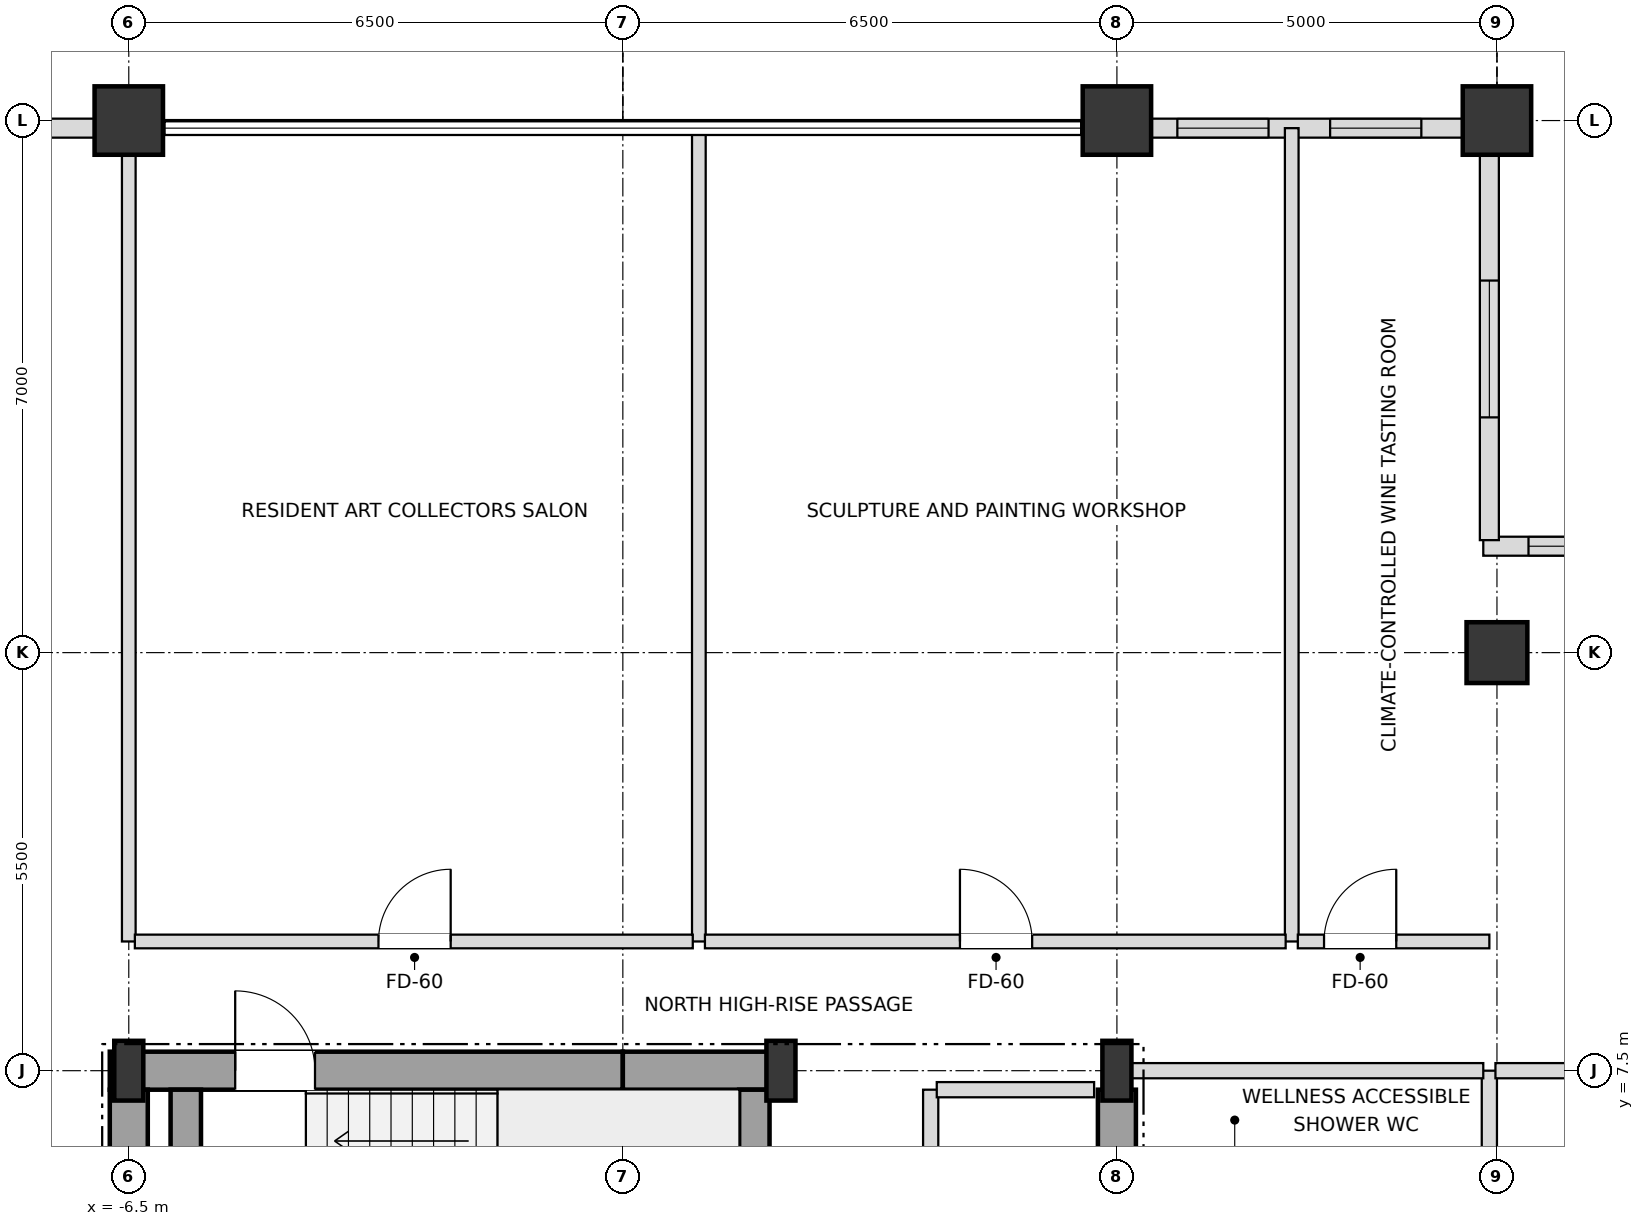
"""IFC4 building model, lengths in metres.
Left out: names, types, materials, properties, quantities, classifications, styles, units other than length and angle.
Written with IfcOpenShell. Run it as: python <this file> out.ifc"""

import sys

from ifc_helpers import new_model, si_unit, direction, frame, frame_2d, origin, origin_2d, place, context, subcontext, project, spatial, rectangle, i_section, extrude, element, fill, save


model = new_model("IFC4")
c1 = context("Model", 3, precision=1e-05, world=origin(), true_north=direction((0.0, 1.0)))
c2 = subcontext(c1, "Body", "Model", "MODEL_VIEW")
j1 = project(units=[si_unit("LENGTHUNIT", "METRE"), si_unit("PLANEANGLEUNIT", "RADIAN")], contexts=[c1])
p1 = place(None, origin())
s1 = spatial("IfcSite", under=j1, at=p1, CompositionType="ELEMENT")
p2 = place(p1, origin())
s2 = spatial("IfcBuilding", under=s1, at=p2, CompositionType="ELEMENT")
p3 = place(p2, frame((0.0, 0.0, 272.7)))
s3 = spatial("IfcBuildingStorey", under=s2, at=p3, CompositionType="ELEMENT", Elevation=272.7)
for number, where, z_axis, x_axis in (
    (1, (-6.5, 7.5, 0.0), (0.0, 0.0, 1.0), (1.0, 0.0, 0.0)),
    (2, (2.08, 7.5, 0.0), (0.0, 0.0, 1.0), (1.0, 0.0, 0.0)),
    (3, (6.5, 7.5, 0.0), (0.0, 0.0, 1.0), (1.0, 0.0, 0.0)),
):
    element("IfcColumn", number, at=place(p3, frame(where, z_axis=z_axis, x_axis=x_axis)), inside=s3, PredefinedType="COLUMN", context=c2, shape_type="SweptSolid", body=[
        extrude(i_section(OverallWidth=0.382, OverallDepth=0.786, WebThickness=0.02, FlangeThickness=0.033, at=origin_2d()), origin(), (0.0, 0.0, 1.0), 3.6),
    ])
for number, where, z_axis, x_axis in (
    (4, (11.5, 20.0, 0.0), (0.0, 0.0, 1.0), (1.0, 0.0, 0.0)),
    (5, (6.5, 20.0, 0.0), (0.0, 0.0, 1.0), (1.0, 0.0, 0.0)),
    (6, (-6.5, 20.0, 0.0), (0.0, 0.0, 1.0), (1.0, 0.0, 0.0)),
):
    element("IfcColumn", number, at=place(p3, frame(where, z_axis=z_axis, x_axis=x_axis)), inside=s3, PredefinedType="USERDEFINED", context=c2, shape_type="SweptSolid", body=[
        extrude(rectangle(XDim=0.9, YDim=0.9, at=origin_2d()), origin(), (0.0, 0.0, 1.0), 3.6),
    ])
p4 = place(p3, frame((11.5, 13.0, 0.0), z_axis=(0.0, 0.0, 1.0), x_axis=(1.0, 0.0, 0.0)))
e7 = element("IfcColumn", 7, at=p4, inside=s3, PredefinedType="COLUMN", context=c2, shape_type="SweptSolid", body=[
    extrude(rectangle(XDim=0.8, YDim=0.8, at=origin_2d()), origin(), (0.0, 0.0, 1.0), 3.6),
])
p5 = place(p3, frame((11.055, 19.9, 0.0), z_axis=(0.0, 0.0, 1.0), x_axis=(-1.0, 0.0, 0.0)))
e8 = element("IfcWall", 8, at=p5, inside=s3, PredefinedType="SOLIDWALL", context=c2, shape_type="SweptSolid", body=[
    extrude(rectangle(XDim=4.11, YDim=0.25, at=frame_2d((2.055, 0.0))), origin(), (0.0, 0.0, 1.0), 2.748),
])
p6 = place(p5, frame((0.55, 0.0, 0.72)))
e9 = element("IfcOpeningElement", 9, at=p6, cuts=e8, PredefinedType="OPENING", context=c2, shape_type="SweptSolid", body=[
    extrude(rectangle(XDim=1.2, YDim=1.68, at=frame_2d((0.6, 0.84))), frame((0.0, 0.135, 0.0), z_axis=(0.0, -1.0, 0.0), x_axis=(1.0, 0.0, 0.0)), (0.0, 0.0, 1.0), 0.27),
])
p7 = place(p5, frame((2.56, 0.0, 0.72)))
e10 = element("IfcOpeningElement", 10, at=p7, cuts=e8, PredefinedType="OPENING", context=c2, shape_type="SweptSolid", body=[
    extrude(rectangle(XDim=1.2, YDim=1.68, at=frame_2d((0.6, 0.84))), frame((0.0, 0.135, 0.0), z_axis=(0.0, -1.0, 0.0), x_axis=(1.0, 0.0, 0.0)), (0.0, 0.0, 1.0), 0.27),
])
p8 = place(p3, frame((-6.945, 19.9, 0.0), z_axis=(0.0, 0.0, 1.0), x_axis=(-1.0, 0.0, 0.0)))
e11 = element("IfcWall", 11, at=p8, inside=s3, PredefinedType="SOLIDWALL", context=c2, shape_type="SweptSolid", body=[
    extrude(rectangle(XDim=4.11, YDim=0.25, at=frame_2d((2.055, 0.0))), origin(), (0.0, 0.0, 1.0), 2.748),
])
p9 = place(p8, frame((1.155, 0.0, 0.72)))
e12 = element("IfcOpeningElement", 12, at=p9, cuts=e11, PredefinedType="OPENING", context=c2, shape_type="SweptSolid", body=[
    extrude(rectangle(XDim=1.8, YDim=1.68, at=frame_2d((0.9, 0.84))), frame((0.0, 0.135, 0.0), z_axis=(0.0, -1.0, 0.0), x_axis=(1.0, 0.0, 0.0)), (0.0, 0.0, 1.0), 0.27),
])
p10 = place(p3, frame((16.98, 14.4, 0.0), z_axis=(0.0, 0.0, 1.0), x_axis=(-1.0, 0.0, 0.0)))
e13 = element("IfcWall", 13, at=p10, inside=s3, PredefinedType="SOLIDWALL", context=c2, shape_type="SweptSolid", body=[
    extrude(rectangle(XDim=5.66, YDim=0.25, at=frame_2d((2.83, 0.0))), origin(), (0.0, 0.0, 1.0), 2.748),
])
p11 = place(p10, frame((0.595, 0.0, 0.72)))
e14 = element("IfcOpeningElement", 14, at=p11, cuts=e13, PredefinedType="OPENING", context=c2, shape_type="SweptSolid", body=[
    extrude(rectangle(XDim=1.8, YDim=1.68, at=frame_2d((0.9, 0.84))), frame((0.0, 0.135, 0.0), z_axis=(0.0, -1.0, 0.0), x_axis=(1.0, 0.0, 0.0)), (0.0, 0.0, 1.0), 0.27),
])
p12 = place(p10, frame((3.265, 0.0, 0.72)))
e15 = element("IfcOpeningElement", 15, at=p12, cuts=e13, PredefinedType="OPENING", context=c2, shape_type="SweptSolid", body=[
    extrude(rectangle(XDim=1.8, YDim=1.68, at=frame_2d((0.9, 0.84))), frame((0.0, 0.135, 0.0), z_axis=(0.0, -1.0, 0.0), x_axis=(1.0, 0.0, 0.0)), (0.0, 0.0, 1.0), 0.27),
])
p13 = place(p3, frame((11.4, 14.48, 0.0), z_axis=(0.0, 0.0, 1.0), x_axis=(0.0, 1.0, 0.0)))
e16 = element("IfcWall", 16, at=p13, inside=s3, PredefinedType="SOLIDWALL", context=c2, shape_type="SweptSolid", body=[
    extrude(rectangle(XDim=5.34, YDim=0.25, at=frame_2d((2.67, 0.0))), origin(), (0.0, 0.0, 1.0), 2.748),
])
p14 = place(p13, frame((1.615, 0.0, 0.72)))
e17 = element("IfcOpeningElement", 17, at=p14, cuts=e16, PredefinedType="OPENING", context=c2, shape_type="SweptSolid", body=[
    extrude(rectangle(XDim=1.8, YDim=1.68, at=frame_2d((0.9, 0.84))), frame((0.0, 0.135, 0.0), z_axis=(0.0, -1.0, 0.0), x_axis=(1.0, 0.0, 0.0)), (0.0, 0.0, 1.0), 0.27),
])
p15 = place(p3, frame((-6.75, 7.5, 0.0), z_axis=(0.0, 0.0, 1.0), x_axis=(1.0, 0.0, 0.0)))
e18 = element("IfcWall", 18, at=p15, inside=s3, PredefinedType="SHEAR", context=c2, shape_type="SweptSolid", body=[
    extrude(rectangle(XDim=6.75, YDim=0.5, at=frame_2d((3.375, 0.0))), origin(), (0.0, 0.0, 1.0), 3.38),
])
p16 = place(p15, frame((1.65, 0.0, 0.0)))
e19 = element("IfcOpeningElement", 19, at=p16, cuts=e18, PredefinedType="OPENING", context=c2, shape_type="SweptSolid", body=[
    extrude(rectangle(XDim=1.05, YDim=2.15, at=frame_2d((0.525, 1.075))), frame((0.0, 0.26, 0.0), z_axis=(0.0, -1.0, 0.0), x_axis=(1.0, 0.0, 0.0)), (0.0, 0.0, 1.0), 0.52),
])
p17 = place(p3, frame((0.0, 7.5, 0.0), z_axis=(0.0, 0.0, 1.0), x_axis=(1.0, 0.0, 0.0)))
e20 = element("IfcWall", 20, at=p17, inside=s3, PredefinedType="SHEAR", context=c2, shape_type="SweptSolid", body=[
    extrude(rectangle(XDim=2.08, YDim=0.5, at=frame_2d((1.04, 0.0))), origin(), (0.0, 0.0, 1.0), 3.38),
])
for number, where, z_axis, x_axis in (
    (21, (-6.5, 3.95, 0.0), (0.0, 0.0, 1.0), (0.0, 1.0, 0.0)),
    (22, (6.5, 3.95, 0.0), (0.0, 0.0, 1.0), (0.0, 1.0, 0.0)),
):
    element("IfcWall", number, at=place(p3, frame(where, z_axis=z_axis, x_axis=x_axis)), inside=s3, PredefinedType="SHEAR", context=c2, shape_type="SweptSolid", body=[
        extrude(rectangle(XDim=3.3, YDim=0.5, at=frame_2d((1.65, 0.0))), origin(), (0.0, 0.0, 1.0), 3.38),
    ])
for number, where, z_axis, x_axis in (
    (23, (1.73, 3.95, 0.0), (0.0, 0.0, 1.0), (0.0, 1.0, 0.0)),
    (24, (-5.75, 3.95, 0.0), (0.0, 0.0, 1.0), (0.0, 1.0, 0.0)),
):
    element("IfcWall", number, at=place(p3, frame(where, z_axis=z_axis, x_axis=x_axis)), inside=s3, PredefinedType="SHEAR", context=c2, shape_type="SweptSolid", body=[
        extrude(rectangle(XDim=3.3, YDim=0.4, at=frame_2d((1.65, 0.0))), origin(), (0.0, 0.0, 1.0), 3.38),
    ])
p18 = place(p3, frame((-6.5, 9.2, 0.0), z_axis=(0.0, 0.0, 1.0), x_axis=(0.0, 1.0, 0.0)))
e25 = element("IfcWall", 25, at=p18, inside=s3, PredefinedType="PARTITIONING", context=c2, shape_type="SweptSolid", body=[
    extrude(rectangle(XDim=10.7, YDim=0.18, at=frame_2d((5.35, 0.0))), origin(), (0.0, 0.0, 1.0), 2.826),
])
p19 = place(p3, frame((1.0, 9.2, 0.0), z_axis=(0.0, 0.0, 1.0), x_axis=(0.0, 1.0, 0.0)))
e26 = element("IfcWall", 26, at=p19, inside=s3, PredefinedType="PARTITIONING", context=c2, shape_type="SweptSolid", body=[
    extrude(rectangle(XDim=10.7, YDim=0.18, at=frame_2d((5.35, 0.0))), origin(), (0.0, 0.0, 1.0), 3.018),
])
p20 = place(p3, frame((4.05, 4.2, 0.0), z_axis=(0.0, 0.0, 1.0), x_axis=(0.0, 1.0, 0.0)))
e27 = element("IfcWall", 27, at=p20, inside=s3, PredefinedType="SOLIDWALL", context=c2, shape_type="SweptSolid", body=[
    extrude(rectangle(XDim=3.05, YDim=0.2, at=frame_2d((1.525, 0.0))), origin(), (0.0, 0.0, 1.0), 3.38),
])
p21 = place(p20, frame((0.975, 0.0, 0.0)))
e28 = element("IfcOpeningElement", 28, at=p21, cuts=e27, PredefinedType="OPENING", context=c2, shape_type="SweptSolid", body=[
    extrude(rectangle(XDim=0.95, YDim=2.15, at=frame_2d((0.475, 1.075))), frame((0.0, 0.11, 0.0), z_axis=(0.0, -1.0, 0.0), x_axis=(1.0, 0.0, 0.0)), (0.0, 0.0, 1.0), 0.22),
])
p22 = place(p3, frame((8.8, 9.2, 0.0), z_axis=(0.0, 0.0, 1.0), x_axis=(0.0, 1.0, 0.0)))
e29 = element("IfcWall", 29, at=p22, inside=s3, PredefinedType="PARTITIONING", context=c2, shape_type="SweptSolid", body=[
    extrude(rectangle(XDim=10.7, YDim=0.18, at=frame_2d((5.35, 0.0))), origin(), (0.0, 0.0, 1.0), 2.826),
])
p23 = place(p3, frame((11.4, 4.5, 0.0), z_axis=(0.0, 0.0, 1.0), x_axis=(0.0, 1.0, 0.0)))
e30 = element("IfcWall", 30, at=p23, inside=s3, PredefinedType="SOLIDWALL", context=c2, shape_type="SweptSolid", body=[
    extrude(rectangle(XDim=3.0, YDim=0.2, at=frame_2d((1.5, 0.0))), origin(), (0.0, 0.0, 1.0), 3.018),
])
p24 = place(p3, frame((4.13, 7.25, 0.0), z_axis=(0.0, 0.0, 1.0), x_axis=(1.0, 0.0, 0.0)))
e31 = element("IfcWall", 31, at=p24, inside=s3, PredefinedType="SOLIDWALL", context=c2, shape_type="SweptSolid", body=[
    extrude(rectangle(XDim=2.07, YDim=0.2, at=frame_2d((1.035, 0.0))), origin(), (0.0, 0.0, 1.0), 3.38),
])
p25 = place(p3, frame((6.5, 7.5, 0.0), z_axis=(0.0, 0.0, 1.0), x_axis=(1.0, 0.0, 0.0)))
e32 = element("IfcWall", 32, at=p25, inside=s3, PredefinedType="SOLIDWALL", context=c2, shape_type="SweptSolid", body=[
    extrude(rectangle(XDim=4.82, YDim=0.2, at=frame_2d((2.41, 0.0))), origin(), (0.0, 0.0, 1.0), 2.826),
])
p26 = place(p3, frame((11.48, 7.5, 0.0), z_axis=(0.0, 0.0, 1.0), x_axis=(1.0, 0.0, 0.0)))
e33 = element("IfcWall", 33, at=p26, inside=s3, PredefinedType="SOLIDWALL", context=c2, shape_type="SweptSolid", body=[
    extrude(rectangle(XDim=5.42, YDim=0.2, at=frame_2d((2.71, 0.0))), origin(), (0.0, 0.0, 1.0), 2.826),
])
p27 = place(p3, frame((-6.42, 9.2, 0.0), z_axis=(0.0, 0.0, 1.0), x_axis=(1.0, 0.0, 0.0)))
e34 = element("IfcWall", 34, at=p27, inside=s3, PredefinedType="PARTITIONING", context=c2, shape_type="SweptSolid", body=[
    extrude(rectangle(XDim=7.34, YDim=0.18, at=frame_2d((3.67, 0.0))), origin(), (0.0, 0.0, 1.0), 3.38),
])
p28 = place(p27, frame((3.205, 0.0, 0.0)))
e35 = element("IfcOpeningElement", 35, at=p28, cuts=e34, PredefinedType="OPENING", context=c2, shape_type="SweptSolid", body=[
    extrude(rectangle(XDim=0.95, YDim=2.15, at=frame_2d((0.475, 1.075))), frame((0.0, 0.1, 0.0), z_axis=(0.0, -1.0, 0.0), x_axis=(1.0, 0.0, 0.0)), (0.0, 0.0, 1.0), 0.2),
])
p29 = place(p3, frame((1.08, 9.2, 0.0), z_axis=(0.0, 0.0, 1.0), x_axis=(1.0, 0.0, 0.0)))
e36 = element("IfcWall", 36, at=p29, inside=s3, PredefinedType="PARTITIONING", context=c2, shape_type="SweptSolid", body=[
    extrude(rectangle(XDim=7.64, YDim=0.18, at=frame_2d((3.82, 0.0))), origin(), (0.0, 0.0, 1.0), 2.826),
])
p30 = place(p29, frame((3.355, 0.0, 0.0)))
e37 = element("IfcOpeningElement", 37, at=p30, cuts=e36, PredefinedType="OPENING", context=c2, shape_type="SweptSolid", body=[
    extrude(rectangle(XDim=0.95, YDim=2.15, at=frame_2d((0.475, 1.075))), frame((0.0, 0.1, 0.0), z_axis=(0.0, -1.0, 0.0), x_axis=(1.0, 0.0, 0.0)), (0.0, 0.0, 1.0), 0.2),
])
p31 = place(p3, frame((8.88, 9.2, 0.0), z_axis=(0.0, 0.0, 1.0), x_axis=(1.0, 0.0, 0.0)))
e38 = element("IfcWall", 38, at=p31, inside=s3, PredefinedType="PARTITIONING", context=c2, shape_type="SweptSolid", body=[
    extrude(rectangle(XDim=2.52, YDim=0.18, at=frame_2d((1.26, 0.0))), origin(), (0.0, 0.0, 1.0), 3.38),
])
p32 = place(p31, frame((0.345, 0.0, 0.0)))
e39 = element("IfcOpeningElement", 39, at=p32, cuts=e38, PredefinedType="OPENING", context=c2, shape_type="SweptSolid", body=[
    extrude(rectangle(XDim=0.95, YDim=2.15, at=frame_2d((0.475, 1.075))), frame((0.0, 0.1, 0.0), z_axis=(0.0, -1.0, 0.0), x_axis=(1.0, 0.0, 0.0)), (0.0, 0.0, 1.0), 0.2),
])
p33 = place(p6, origin())
e40 = element("IfcWindow", 40, at=p33, inside=s3, PartitioningType="SINGLE_PANEL", PredefinedType="WINDOW", context=c2, shape_type="SweptSolid", body=[
    extrude(rectangle(XDim=1.2, YDim=1.68, at=frame_2d((0.6, 0.84))), frame((0.0, 0.03, 0.0), z_axis=(0.0, -1.0, 0.0), x_axis=(1.0, 0.0, 0.0)), (0.0, 0.0, 1.0), 0.06),
])
fill(e9, e40)
p34 = place(p7, origin())
e41 = element("IfcWindow", 41, at=p34, inside=s3, PartitioningType="SINGLE_PANEL", PredefinedType="WINDOW", context=c2, shape_type="SweptSolid", body=[
    extrude(rectangle(XDim=1.2, YDim=1.68, at=frame_2d((0.6, 0.84))), frame((0.0, 0.03, 0.0), z_axis=(0.0, -1.0, 0.0), x_axis=(1.0, 0.0, 0.0)), (0.0, 0.0, 1.0), 0.06),
])
fill(e10, e41)
p35 = place(p12, origin())
e42 = element("IfcWindow", 42, at=p35, inside=s3, PartitioningType="SINGLE_PANEL", PredefinedType="WINDOW", context=c2, shape_type="SweptSolid", body=[
    extrude(rectangle(XDim=1.8, YDim=1.68, at=frame_2d((0.9, 0.84))), frame((0.0, 0.03, 0.0), z_axis=(0.0, -1.0, 0.0), x_axis=(1.0, 0.0, 0.0)), (0.0, 0.0, 1.0), 0.06),
])
fill(e15, e42)
p36 = place(p14, origin())
e43 = element("IfcWindow", 43, at=p36, inside=s3, PartitioningType="SINGLE_PANEL", PredefinedType="WINDOW", context=c2, shape_type="SweptSolid", body=[
    extrude(rectangle(XDim=1.8, YDim=1.68, at=frame_2d((0.9, 0.84))), frame((0.0, 0.03, 0.0), z_axis=(0.0, -1.0, 0.0), x_axis=(1.0, 0.0, 0.0)), (0.0, 0.0, 1.0), 0.06),
])
fill(e17, e43)
p37 = place(p16, origin())
e44 = element("IfcDoor", 44, at=p37, inside=s3, OperationType="SINGLE_SWING_LEFT", PredefinedType="DOOR", context=c2, shape_type="SweptSolid", body=[
    extrude(rectangle(XDim=1.05, YDim=2.15, at=frame_2d((0.525, 1.075))), frame((0.0, 0.025, 0.0), z_axis=(0.0, -1.0, 0.0), x_axis=(1.0, 0.0, 0.0)), (0.0, 0.0, 1.0), 0.05),
])
fill(e19, e44)
p38 = place(p28, origin())
e45 = element("IfcDoor", 45, at=p38, inside=s3, OperationType="SINGLE_SWING_RIGHT", PredefinedType="DOOR", context=c2, shape_type="SweptSolid", body=[
    extrude(rectangle(XDim=0.95, YDim=2.15, at=frame_2d((0.475, 1.075))), frame((0.0, 0.025, 0.0), z_axis=(0.0, -1.0, 0.0), x_axis=(1.0, 0.0, 0.0)), (0.0, 0.0, 1.0), 0.05),
])
fill(e35, e45)
p39 = place(p30, origin())
e46 = element("IfcDoor", 46, at=p39, inside=s3, OperationType="SINGLE_SWING_LEFT", PredefinedType="DOOR", context=c2, shape_type="SweptSolid", body=[
    extrude(rectangle(XDim=0.95, YDim=2.15, at=frame_2d((0.475, 1.075))), frame((0.0, 0.025, 0.0), z_axis=(0.0, -1.0, 0.0), x_axis=(1.0, 0.0, 0.0)), (0.0, 0.0, 1.0), 0.05),
])
fill(e37, e46)
p40 = place(p32, origin())
e47 = element("IfcDoor", 47, at=p40, inside=s3, OperationType="SINGLE_SWING_RIGHT", PredefinedType="DOOR", context=c2, shape_type="SweptSolid", body=[
    extrude(rectangle(XDim=0.95, YDim=2.15, at=frame_2d((0.475, 1.075))), frame((0.0, 0.025, 0.0), z_axis=(0.0, -1.0, 0.0), x_axis=(1.0, 0.0, 0.0)), (0.0, 0.0, 1.0), 0.05),
])
fill(e39, e47)
save(model, sys.argv[1])
